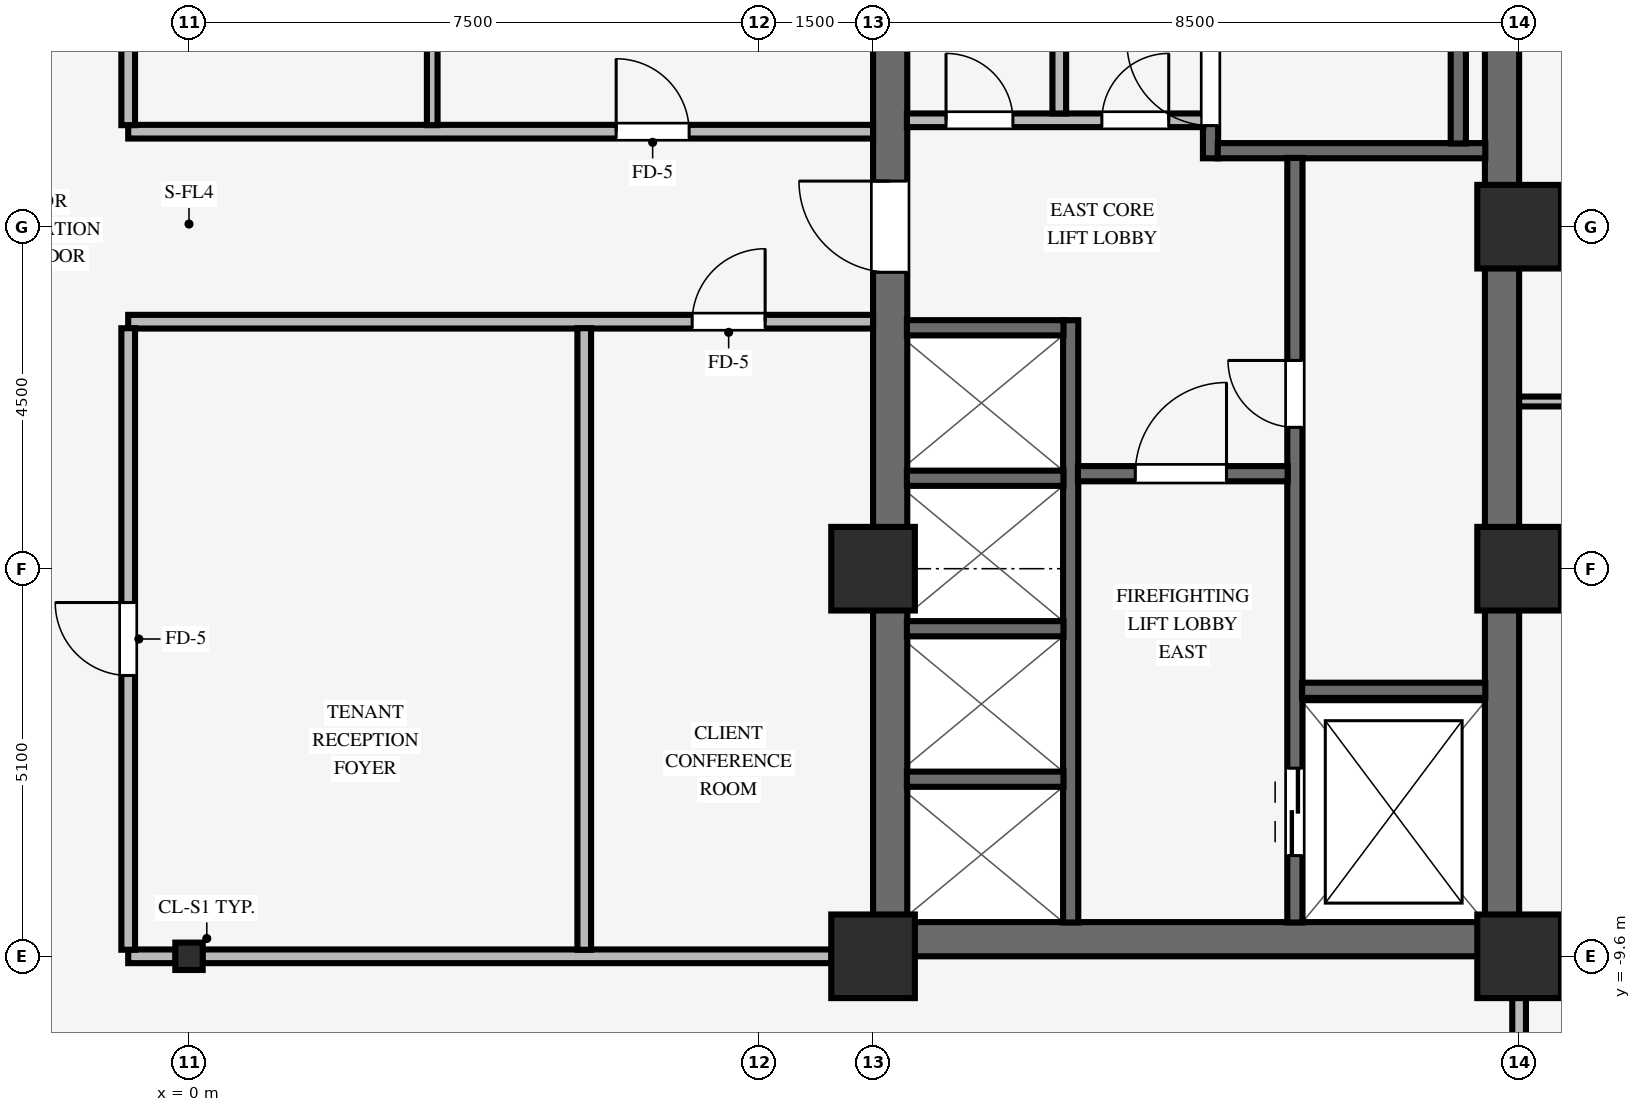
"""IFC4 building model, lengths in metres.
Left out: names, types, materials, properties, quantities, classifications, styles, units other than length and angle.
Written with IfcOpenShell. Run it as: python <this file> out.ifc"""

import sys

from ifc_helpers import new_model, si_unit, direction, frame, frame_2d, origin, origin_2d, place, context, subcontext, project, spatial, rectangle, i_section, extrude, source, transform, mapped, element, fill, save


model = new_model("IFC4")
c1 = context("Model", 3, precision=1e-05, world=origin(), true_north=direction((0.0, 1.0)))
c2 = subcontext(c1, "Body", "Model", "MODEL_VIEW")
j1 = project(units=[si_unit("LENGTHUNIT", "METRE"), si_unit("PLANEANGLEUNIT", "RADIAN")], contexts=[c1])
p1 = place(None, origin())
s1 = spatial("IfcSite", under=j1, at=p1, CompositionType="ELEMENT")
p2 = place(p1, origin())
s2 = spatial("IfcBuilding", under=s1, at=p2, CompositionType="ELEMENT")
p3 = place(p2, frame((0.0, 0.0, 78.7)))
s3 = spatial("IfcBuildingStorey", under=s2, at=p3, CompositionType="ELEMENT", Elevation=78.7)
p4 = place(p3, frame((9.0, -9.375, 0.0), z_axis=(0.0, 0.0, 1.0), x_axis=(1.0, 0.0, 0.0)))
e1 = element("IfcWall", 1, at=p4, inside=s3, PredefinedType="SHEAR", context=c2, shape_type="SweptSolid", body=[
    extrude(rectangle(XDim=8.5, YDim=0.45, at=frame_2d((4.25, 0.0))), origin(), (0.0, 0.0, 1.0), 3.37),
])
p5 = place(p3, frame((9.225, -9.155, 0.0), z_axis=(0.0, 0.0, 1.0), x_axis=(0.0, 1.0, 0.0)))
e2 = element("IfcWall", 2, at=p5, inside=s3, PredefinedType="SHEAR", context=c2, shape_type="SweptSolid", body=[
    extrude(rectangle(XDim=18.31, YDim=0.45, at=frame_2d((9.155, 0.0))), origin(), (0.0, 0.0, 1.0), 3.37),
])
p6 = place(p5, frame((8.555, 0.0, 0.0)))
e3 = element("IfcOpeningElement", 3, at=p6, cuts=e2, PredefinedType="OPENING", context=c2, shape_type="SweptSolid", body=[
    extrude(rectangle(XDim=1.2, YDim=2.15, at=frame_2d((0.6, 1.075))), frame((0.0, 0.235, 0.0), z_axis=(0.0, -1.0, 0.0), x_axis=(1.0, 0.0, 0.0)), (0.0, 0.0, 1.0), 0.47),
])
p7 = place(p3, frame((17.275, -9.155, 0.0), z_axis=(0.0, 0.0, 1.0), x_axis=(0.0, 1.0, 0.0)))
e4 = element("IfcWall", 4, at=p7, inside=s3, PredefinedType="SHEAR", context=c2, shape_type="SweptSolid", body=[
    extrude(rectangle(XDim=18.31, YDim=0.45, at=frame_2d((9.155, 0.0))), origin(), (0.0, 0.0, 1.0), 3.37),
])
for number, where, z_axis, x_axis in (
    (5, (9.0, -9.6, 0.0), (0.0, 0.0, 1.0), (1.0, 0.0, 0.0)),
    (6, (9.0, -4.5, 0.0), (0.0, 0.0, 1.0), (1.0, 0.0, 0.0)),
    (7, (17.5, -9.6, 0.0), (0.0, 0.0, 1.0), (1.0, 0.0, 0.0)),
    (8, (17.5, -4.5, 0.0), (0.0, 0.0, 1.0), (1.0, 0.0, 0.0)),
    (9, (17.5, 0.0, 0.0), (0.0, 0.0, 1.0), (1.0, 0.0, 0.0)),
):
    element("IfcColumn", number, at=place(p3, frame(where, z_axis=z_axis, x_axis=x_axis)), inside=s3, PredefinedType="COLUMN", context=c2, shape_type="SweptSolid", body=[
        extrude(rectangle(XDim=1.1, YDim=1.1, at=origin_2d()), origin(), (0.0, 0.0, 1.0), 3.37),
    ])
p8 = place(p3, frame((0.0, -9.6, 0.0), z_axis=(0.0, 0.0, 1.0), x_axis=(1.0, 0.0, 0.0)))
e10 = element("IfcColumn", 10, at=p8, inside=s3, PredefinedType="COLUMN", context=c2, shape_type="SweptSolid", body=[
    extrude(i_section(OverallWidth=0.36, OverallDepth=0.36, WebThickness=0.021, FlangeThickness=0.021, FilletRadius=0.018, at=origin_2d()), origin(), (0.0, 0.0, 1.0), 3.37),
])
p9 = place(p3, frame((13.44, 0.9, 0.0), z_axis=(0.0, 0.0, 1.0), x_axis=(0.0, 1.0, 0.0)))
e11 = element("IfcWall", 11, at=p9, inside=s3, PredefinedType="SHEAR", context=c2, shape_type="SweptSolid", body=[
    extrude(rectangle(XDim=8.255, YDim=0.2, at=frame_2d((4.127, 0.0))), origin(), (0.0, 0.0, 1.0), 3.37),
])
p10 = place(p9, frame((0.43, 0.0, 0.0)))
e12 = element("IfcOpeningElement", 12, at=p10, cuts=e11, PredefinedType="OPENING", context=c2, shape_type="SweptSolid", body=[
    extrude(rectangle(XDim=1.1, YDim=2.15, at=frame_2d((0.55, 1.075))), frame((0.0, 0.11, 0.0), z_axis=(0.0, -1.0, 0.0), x_axis=(1.0, 0.0, 0.0)), (0.0, 0.0, 1.0), 0.22),
])
p11 = place(p3, frame((13.535, 1.0, 0.0), z_axis=(0.0, 0.0, 1.0), x_axis=(1.0, 0.0, 0.0)))
e13 = element("IfcWall", 13, at=p11, inside=s3, PredefinedType="SHEAR", context=c2, shape_type="SweptSolid", body=[
    extrude(rectangle(XDim=3.52, YDim=0.2, at=frame_2d((1.76, 0.0))), origin(), (0.0, 0.0, 1.0), 3.37),
])
p12 = place(p3, frame((16.7, 1.095, 0.0), z_axis=(0.0, 0.0, 1.0), x_axis=(0.0, 1.0, 0.0)))
e14 = element("IfcWall", 14, at=p12, inside=s3, PredefinedType="SHEAR", context=c2, shape_type="SweptSolid", body=[
    extrude(rectangle(XDim=8.06, YDim=0.2, at=frame_2d((4.03, 0.0))), origin(), (0.0, 0.0, 1.0), 3.37),
])
p13 = place(p3, frame((14.55, -9.155, 0.0), z_axis=(0.0, 0.0, 1.0), x_axis=(0.0, 1.0, 0.0)))
e15 = element("IfcWall", 15, at=p13, inside=s3, PredefinedType="SHEAR", context=c2, shape_type="SweptSolid", body=[
    extrude(rectangle(XDim=10.06, YDim=0.2, at=frame_2d((5.03, 0.0))), origin(), (0.0, 0.0, 1.0), 3.37),
])
p14 = place(p13, frame((6.515, 0.0, 0.0)))
e16 = element("IfcOpeningElement", 16, at=p14, cuts=e15, PredefinedType="OPENING", context=c2, shape_type="SweptSolid", body=[
    extrude(rectangle(XDim=0.88, YDim=2.1, at=frame_2d((0.44, 1.05))), frame((0.0, 0.11, 0.0), z_axis=(0.0, -1.0, 0.0), x_axis=(1.0, 0.0, 0.0)), (0.0, 0.0, 1.0), 0.22),
])
p15 = place(p13, frame((0.88, 0.0, 0.0)))
e17 = element("IfcOpeningElement", 17, at=p15, cuts=e15, PredefinedType="OPENING", context=c2, shape_type="SweptSolid", body=[
    extrude(rectangle(XDim=1.15, YDim=2.15, at=frame_2d((0.575, 1.075))), frame((0.0, 0.11, 0.0), z_axis=(0.0, -1.0, 0.0), x_axis=(1.0, 0.0, 0.0)), (0.0, 0.0, 1.0), 0.22),
])
p16 = place(p3, frame((14.645, -6.1, 0.0), z_axis=(0.0, 0.0, 1.0), x_axis=(1.0, 0.0, 0.0)))
e18 = element("IfcWall", 18, at=p16, inside=s3, PredefinedType="SHEAR", context=c2, shape_type="SweptSolid", body=[
    extrude(rectangle(XDim=2.41, YDim=0.2, at=frame_2d((1.205, 0.0))), origin(), (0.0, 0.0, 1.0), 3.37),
])
p17 = place(p3, frame((11.6, -9.155, 0.0), z_axis=(0.0, 0.0, 1.0), x_axis=(0.0, 1.0, 0.0)))
e19 = element("IfcWall", 19, at=p17, inside=s3, PredefinedType="SHEAR", context=c2, shape_type="SweptSolid", body=[
    extrude(rectangle(XDim=7.925, YDim=0.2, at=frame_2d((3.962, 0.0))), origin(), (0.0, 0.0, 1.0), 3.37),
])
p18 = place(p3, frame((11.695, -3.25, 0.0), z_axis=(0.0, 0.0, 1.0), x_axis=(1.0, 0.0, 0.0)))
e20 = element("IfcWall", 20, at=p18, inside=s3, PredefinedType="SHEAR", context=c2, shape_type="SweptSolid", body=[
    extrude(rectangle(XDim=2.76, YDim=0.2, at=frame_2d((1.38, 0.0))), origin(), (0.0, 0.0, 1.0), 3.37),
])
p19 = place(p18, frame((0.755, 0.0, 0.0)))
e21 = element("IfcOpeningElement", 21, at=p19, cuts=e20, PredefinedType="OPENING", context=c2, shape_type="SweptSolid", body=[
    extrude(rectangle(XDim=1.2, YDim=2.15, at=frame_2d((0.6, 1.075))), frame((0.0, 0.11, 0.0), z_axis=(0.0, -1.0, 0.0), x_axis=(1.0, 0.0, 0.0)), (0.0, 0.0, 1.0), 0.22),
])
for number, where, z_axis, x_axis in (
    (22, (9.445, -7.27, 0.0), (0.0, 0.0, 1.0), (1.0, 0.0, 0.0)),
    (23, (9.445, -5.29, 0.0), (0.0, 0.0, 1.0), (1.0, 0.0, 0.0)),
    (24, (9.445, -3.31, 0.0), (0.0, 0.0, 1.0), (1.0, 0.0, 0.0)),
    (25, (9.445, -1.33, 0.0), (0.0, 0.0, 1.0), (1.0, 0.0, 0.0)),
):
    element("IfcWall", number, at=place(p3, frame(where, z_axis=z_axis, x_axis=x_axis)), inside=s3, PredefinedType="SHEAR", context=c2, shape_type="SweptSolid", body=[
        extrude(rectangle(XDim=2.06, YDim=0.2, at=frame_2d((1.03, 0.0))), origin(), (0.0, 0.0, 1.0), 3.37),
    ])
p20 = place(p3, frame((9.445, 1.4, 0.0), z_axis=(0.0, 0.0, 1.0), x_axis=(1.0, 0.0, 0.0)))
e26 = element("IfcWall", 26, at=p20, inside=s3, PredefinedType="PARTITIONING", context=c2, shape_type="SweptSolid", body=[
    extrude(rectangle(XDim=3.9, YDim=0.18, at=frame_2d((1.95, 0.0))), origin(), (0.0, 0.0, 1.0), 3.36),
])
p21 = place(p20, frame((0.515, 0.0, 0.0)))
e27 = element("IfcOpeningElement", 27, at=p21, cuts=e26, PredefinedType="OPENING", context=c2, shape_type="SweptSolid", body=[
    extrude(rectangle(XDim=0.88, YDim=2.1, at=frame_2d((0.44, 1.05))), frame((0.0, 0.1, 0.0), z_axis=(0.0, -1.0, 0.0), x_axis=(1.0, 0.0, 0.0)), (0.0, 0.0, 1.0), 0.2),
])
p22 = place(p20, frame((2.565, 0.0, 0.0)))
e28 = element("IfcOpeningElement", 28, at=p22, cuts=e26, PredefinedType="OPENING", context=c2, shape_type="SweptSolid", body=[
    extrude(rectangle(XDim=0.88, YDim=2.1, at=frame_2d((0.44, 1.05))), frame((0.0, 0.1, 0.0), z_axis=(0.0, -1.0, 0.0), x_axis=(1.0, 0.0, 0.0)), (0.0, 0.0, 1.0), 0.2),
])
p23 = place(p3, frame((11.45, 1.49, 0.0), z_axis=(0.0, 0.0, 1.0), x_axis=(0.0, 1.0, 0.0)))
e29 = element("IfcWall", 29, at=p23, inside=s3, PredefinedType="PARTITIONING", context=c2, shape_type="SweptSolid", body=[
    extrude(rectangle(XDim=7.665, YDim=0.18, at=frame_2d((3.833, 0.0))), origin(), (0.0, 0.0, 1.0), 3.36),
])
p24 = place(p3, frame((-0.8, -9.6, 0.0), z_axis=(0.0, 0.0, 1.0), x_axis=(1.0, 0.0, 0.0)))
e30 = element("IfcWall", 30, at=p24, inside=s3, PredefinedType="PARTITIONING", context=c2, shape_type="SweptSolid", body=[
    extrude(rectangle(XDim=0.624, YDim=0.18, at=frame_2d((0.312, 0.0))), origin(), (0.0, 0.0, 1.0), 2.405),
])
p25 = place(p3, frame((0.176, -9.6, 0.0), z_axis=(0.0, 0.0, 1.0), x_axis=(1.0, 0.0, 0.0)))
e31 = element("IfcWall", 31, at=p25, inside=s3, PredefinedType="PARTITIONING", context=c2, shape_type="SweptSolid", body=[
    extrude(rectangle(XDim=8.278, YDim=0.18, at=frame_2d((4.139, 0.0))), origin(), (0.0, 0.0, 1.0), 2.405),
])
p26 = place(p3, frame((17.5, -2.3, 0.0), z_axis=(0.0, 0.0, 1.0), x_axis=(1.0, 0.0, 0.0)))
e32 = element("IfcWall", 32, at=p26, inside=s3, PredefinedType="PARTITIONING", context=c2, shape_type="SweptSolid", body=[
    extrude(rectangle(XDim=3.66, YDim=0.13, at=frame_2d((1.83, 0.0))), origin(), (0.0, 0.0, 1.0), 3.36),
])
p27 = place(p3, frame((-0.8, -1.25, 0.0), z_axis=(0.0, 0.0, 1.0), x_axis=(1.0, 0.0, 0.0)))
e33 = element("IfcWall", 33, at=p27, inside=s3, PredefinedType="PARTITIONING", context=c2, shape_type="SweptSolid", body=[
    extrude(rectangle(XDim=9.8, YDim=0.18, at=frame_2d((4.9, 0.0))), origin(), (0.0, 0.0, 1.0), 3.36),
])
p28 = place(p27, frame((7.42, 0.0, 0.0)))
e34 = element("IfcOpeningElement", 34, at=p28, cuts=e33, PredefinedType="OPENING", context=c2, shape_type="SweptSolid", body=[
    extrude(rectangle(XDim=0.96, YDim=2.1, at=frame_2d((0.48, 1.05))), frame((0.0, 0.1, 0.0), z_axis=(0.0, -1.0, 0.0), x_axis=(1.0, 0.0, 0.0)), (0.0, 0.0, 1.0), 0.2),
])
p29 = place(p3, frame((-0.8, 1.25, 0.0), z_axis=(0.0, 0.0, 1.0), x_axis=(1.0, 0.0, 0.0)))
e35 = element("IfcWall", 35, at=p29, inside=s3, PredefinedType="PARTITIONING", context=c2, shape_type="SweptSolid", body=[
    extrude(rectangle(XDim=9.8, YDim=0.18, at=frame_2d((4.9, 0.0))), origin(), (0.0, 0.0, 1.0), 3.36),
])
p30 = place(p29, frame((6.42, 0.0, 0.0)))
e36 = element("IfcOpeningElement", 36, at=p30, cuts=e35, PredefinedType="OPENING", context=c2, shape_type="SweptSolid", body=[
    extrude(rectangle(XDim=0.96, YDim=2.1, at=frame_2d((0.48, 1.05))), frame((0.0, 0.1, 0.0), z_axis=(0.0, -1.0, 0.0), x_axis=(1.0, 0.0, 0.0)), (0.0, 0.0, 1.0), 0.2),
])
p31 = place(p3, frame((-0.8, -9.514, 0.0), z_axis=(0.0, 0.0, 1.0), x_axis=(0.0, 1.0, 0.0)))
e37 = element("IfcWall", 37, at=p31, inside=s3, PredefinedType="PARTITIONING", context=c2, shape_type="SweptSolid", body=[
    extrude(rectangle(XDim=8.178, YDim=0.18, at=frame_2d((4.089, 0.0))), origin(), (0.0, 0.0, 1.0), 3.36),
])
p32 = place(p31, frame((3.609, 0.0, 0.0)))
e38 = element("IfcOpeningElement", 38, at=p32, cuts=e37, PredefinedType="OPENING", context=c2, shape_type="SweptSolid", body=[
    extrude(rectangle(XDim=0.96, YDim=2.1, at=frame_2d((0.48, 1.05))), frame((0.0, 0.1, 0.0), z_axis=(0.0, -1.0, 0.0), x_axis=(1.0, 0.0, 0.0)), (0.0, 0.0, 1.0), 0.2),
])
p33 = place(p3, frame((-0.8, 1.336, 0.0), z_axis=(0.0, 0.0, 1.0), x_axis=(0.0, 1.0, 0.0)))
e39 = element("IfcWall", 39, at=p33, inside=s3, PredefinedType="PARTITIONING", context=c2, shape_type="SweptSolid", body=[
    extrude(rectangle(XDim=8.178, YDim=0.18, at=frame_2d((4.089, 0.0))), origin(), (0.0, 0.0, 1.0), 3.36),
])
p34 = place(p33, frame((3.609, 0.0, 0.0)))
e40 = element("IfcOpeningElement", 40, at=p34, cuts=e39, PredefinedType="OPENING", context=c2, shape_type="SweptSolid", body=[
    extrude(rectangle(XDim=0.96, YDim=2.1, at=frame_2d((0.48, 1.05))), frame((0.0, 0.1, 0.0), z_axis=(0.0, -1.0, 0.0), x_axis=(1.0, 0.0, 0.0)), (0.0, 0.0, 1.0), 0.2),
])
p35 = place(p3, frame((3.2, 1.336, 0.0), z_axis=(0.0, 0.0, 1.0), x_axis=(0.0, 1.0, 0.0)))
e41 = element("IfcWall", 41, at=p35, inside=s3, PredefinedType="PARTITIONING", context=c2, shape_type="SweptSolid", body=[
    extrude(rectangle(XDim=8.178, YDim=0.14, at=frame_2d((4.089, 0.0))), origin(), (0.0, 0.0, 1.0), 3.36),
])
p36 = place(p3, frame((5.2, -9.514, 0.0), z_axis=(0.0, 0.0, 1.0), x_axis=(0.0, 1.0, 0.0)))
e42 = element("IfcWall", 42, at=p36, inside=s3, PredefinedType="PARTITIONING", context=c2, shape_type="SweptSolid", body=[
    extrude(rectangle(XDim=8.178, YDim=0.18, at=frame_2d((4.089, 0.0))), origin(), (0.0, 0.0, 1.0), 3.36),
])
p37 = place(p3, frame((17.5, -11.114, 0.0), z_axis=(0.0, 0.0, 1.0), x_axis=(0.0, 1.0, 0.0)))
e43 = element("IfcWall", 43, at=p37, inside=s3, PredefinedType="PARTITIONING", context=c2, shape_type="SweptSolid", body=[
    extrude(rectangle(XDim=0.968, YDim=0.18, at=frame_2d((0.484, 0.0))), origin(), (0.0, 0.0, 1.0), 2.738),
])
m1 = source(origin(), c2, "Body", "SweptSolid", [
    extrude(rectangle(XDim=1.1, YDim=2.15, at=frame_2d((0.55, 1.075))), frame((0.0, 0.025, 0.0), z_axis=(0.0, -1.0, 0.0), x_axis=(1.0, 0.0, 0.0)), (0.0, 0.0, 1.0), 0.05),
])
p38 = place(p10, origin())
e44 = element("IfcDoor", 44, at=p38, inside=s3, OperationType="SINGLE_SWING_RIGHT", PredefinedType="DOOR", context=c2, shape_type="MappedRepresentation", body=[
    mapped(m1, transform((0.0, 0.0, 0.0), scale=1.0)),
])
fill(e12, e44)
m2 = source(origin(), c2, "Body", "SweptSolid", [
    extrude(rectangle(XDim=0.88, YDim=2.1, at=frame_2d((0.44, 1.05))), frame((0.0, 0.025, 0.0), z_axis=(0.0, -1.0, 0.0), x_axis=(1.0, 0.0, 0.0)), (0.0, 0.0, 1.0), 0.05),
])
p39 = place(p14, origin())
e45 = element("IfcDoor", 45, at=p39, inside=s3, OperationType="SINGLE_SWING_RIGHT", PredefinedType="DOOR", context=c2, shape_type="MappedRepresentation", body=[
    mapped(m2, transform((0.0, 0.0, 0.0), scale=1.0)),
])
fill(e16, e45)
m3 = source(origin(), c2, "Body", "SweptSolid", [
    extrude(rectangle(XDim=1.2, YDim=2.15, at=frame_2d((0.6, 1.075))), frame((0.0, 0.025, 0.0), z_axis=(0.0, -1.0, 0.0), x_axis=(1.0, 0.0, 0.0)), (0.0, 0.0, 1.0), 0.05),
])
p40 = place(p19, origin())
e46 = element("IfcDoor", 46, at=p40, inside=s3, OperationType="SINGLE_SWING_RIGHT", PredefinedType="DOOR", context=c2, shape_type="MappedRepresentation", body=[
    mapped(m3, transform((0.0, 0.0, 0.0), scale=1.0)),
])
fill(e21, e46)
p41 = place(p6, origin())
e47 = element("IfcDoor", 47, at=p41, inside=s3, OperationType="SINGLE_SWING_RIGHT", PredefinedType="DOOR", context=c2, shape_type="MappedRepresentation", body=[
    mapped(m3, transform((0.0, 0.0, 0.0), scale=1.0)),
])
fill(e3, e47)
p42 = place(p21, origin())
e48 = element("IfcDoor", 48, at=p42, inside=s3, OperationType="SINGLE_SWING_LEFT", PredefinedType="DOOR", context=c2, shape_type="MappedRepresentation", body=[
    mapped(m2, transform((0.0, 0.0, 0.0), scale=1.0)),
])
fill(e27, e48)
p43 = place(p22, origin())
e49 = element("IfcDoor", 49, at=p43, inside=s3, OperationType="SINGLE_SWING_RIGHT", PredefinedType="DOOR", context=c2, shape_type="MappedRepresentation", body=[
    mapped(m2, transform((0.0, 0.0, 0.0), scale=1.0)),
])
fill(e28, e49)
m4 = source(origin(), c2, "Body", "SweptSolid", [
    extrude(rectangle(XDim=1.15, YDim=2.15, at=frame_2d((0.575, 1.075))), frame((0.0, 0.025, 0.0), z_axis=(0.0, -1.0, 0.0), x_axis=(1.0, 0.0, 0.0)), (0.0, 0.0, 1.0), 0.05),
])
p44 = place(p15, origin())
e50 = element("IfcDoor", 50, at=p44, inside=s3, OperationType="DOUBLE_DOOR_SLIDING", PredefinedType="DOOR", context=c2, shape_type="MappedRepresentation", body=[
    mapped(m4, transform((0.0, 0.0, 0.0), scale=1.0)),
])
fill(e17, e50)
m5 = source(origin(), c2, "Body", "SweptSolid", [
    extrude(rectangle(XDim=0.96, YDim=2.1, at=frame_2d((0.48, 1.05))), frame((0.0, 0.025, 0.0), z_axis=(0.0, -1.0, 0.0), x_axis=(1.0, 0.0, 0.0)), (0.0, 0.0, 1.0), 0.05),
])
p45 = place(p32, origin())
e51 = element("IfcDoor", 51, at=p45, inside=s3, OperationType="SINGLE_SWING_RIGHT", PredefinedType="DOOR", context=c2, shape_type="MappedRepresentation", body=[
    mapped(m5, transform((0.0, 0.0, 0.0), scale=1.0)),
])
fill(e38, e51)
p46 = place(p30, origin())
e52 = element("IfcDoor", 52, at=p46, inside=s3, OperationType="SINGLE_SWING_LEFT", PredefinedType="DOOR", context=c2, shape_type="MappedRepresentation", body=[
    mapped(m5, transform((0.0, 0.0, 0.0), scale=1.0)),
])
fill(e36, e52)
p47 = place(p28, origin())
e53 = element("IfcDoor", 53, at=p47, inside=s3, OperationType="SINGLE_SWING_RIGHT", PredefinedType="DOOR", context=c2, shape_type="MappedRepresentation", body=[
    mapped(m5, transform((0.0, 0.0, 0.0), scale=1.0)),
])
fill(e34, e53)
save(model, sys.argv[1])
